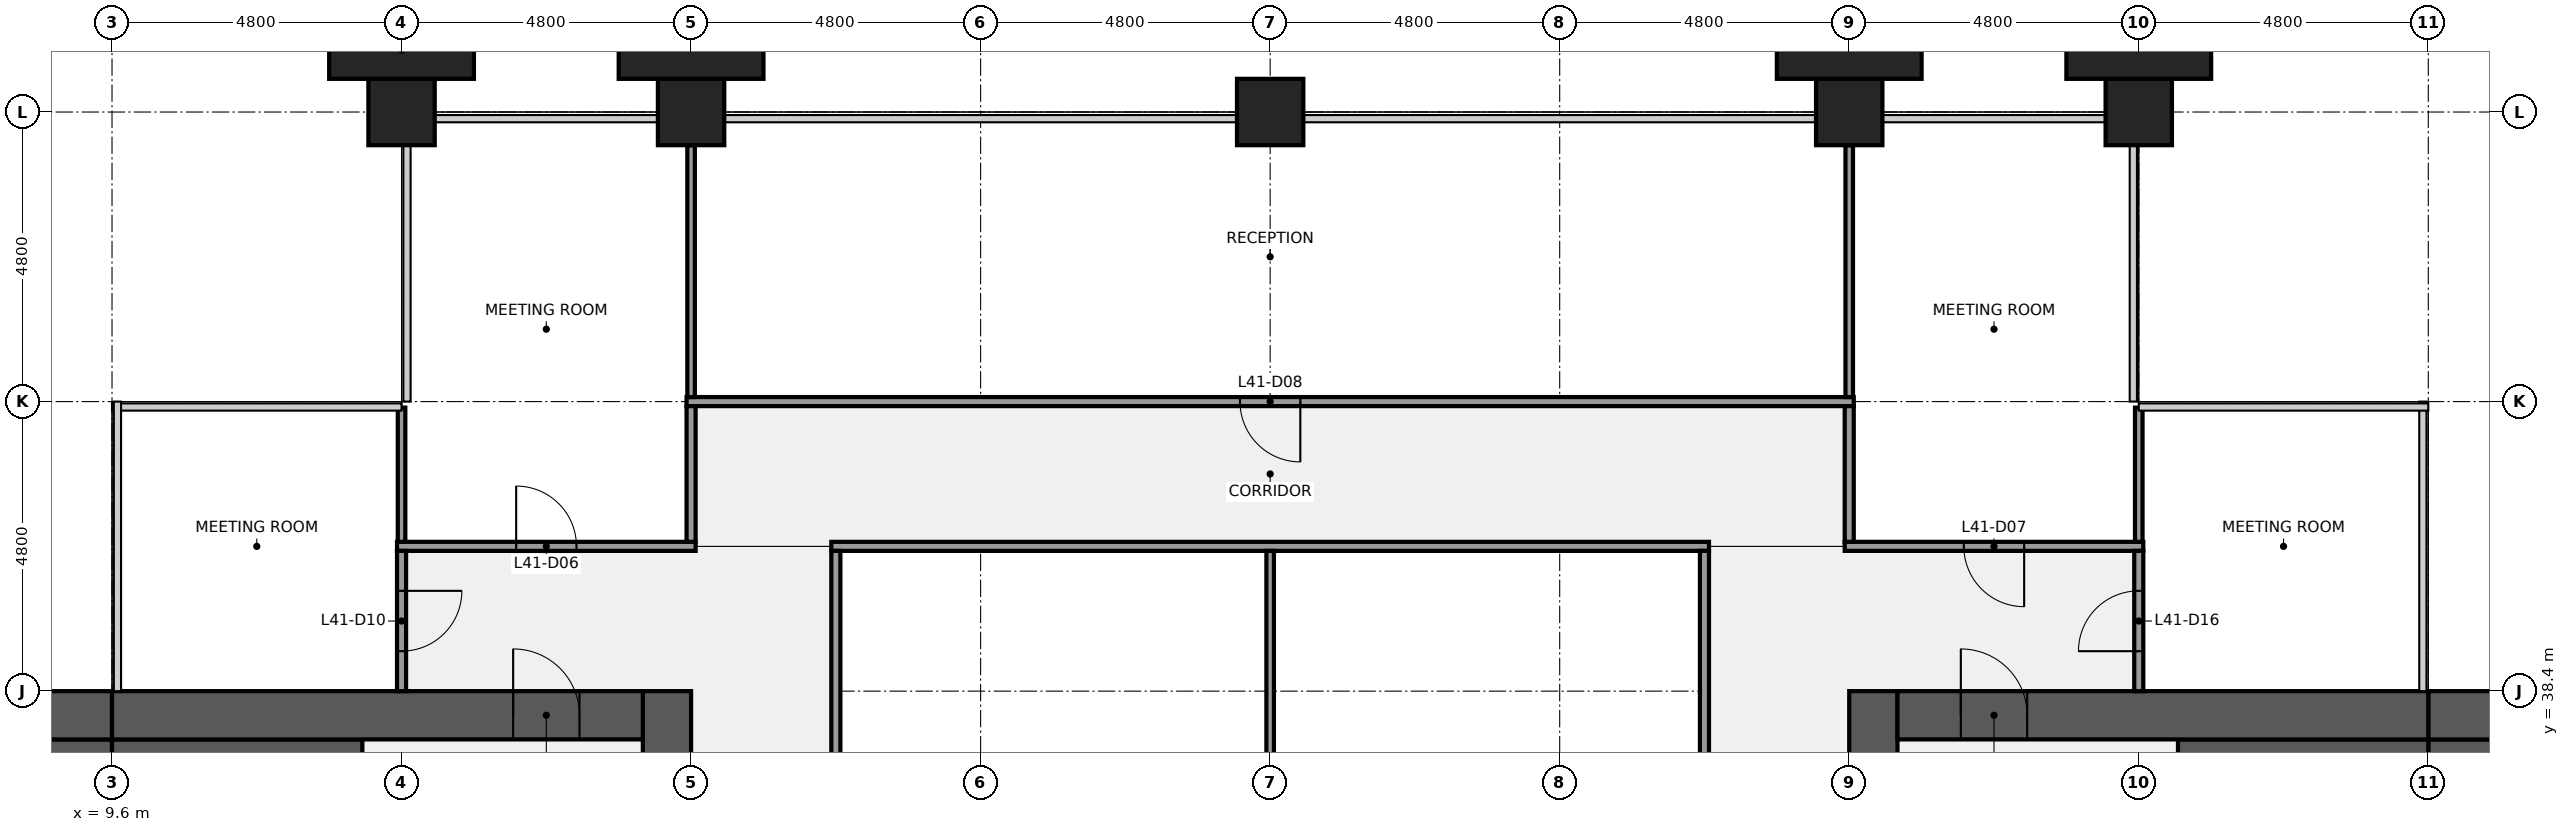
"""IFC4 building model, lengths in metres.
Left out: names, types, materials, properties, quantities, classifications, styles, units other than length and angle.
Written with IfcOpenShell. Run it as: python <this file> out.ifc"""

import sys

from ifc_helpers import new_model, si_unit, direction, frame, frame_2d, origin, origin_2d, place, context, subcontext, project, spatial, rectangle, extrude, element, fill, save


model = new_model("IFC4")
c1 = context("Model", 3, precision=1e-05, world=origin(), true_north=direction((0.0, 1.0)))
c2 = subcontext(c1, "Body", "Model", "MODEL_VIEW")
j1 = project(units=[si_unit("LENGTHUNIT", "METRE"), si_unit("PLANEANGLEUNIT", "RADIAN")], contexts=[c1])
p1 = place(None, origin())
s1 = spatial("IfcSite", under=j1, at=p1, CompositionType="ELEMENT")
p2 = place(p1, origin())
s2 = spatial("IfcBuilding", under=s1, at=p2, CompositionType="ELEMENT")
p3 = place(p2, frame((0.0, 0.0, 193.2)))
s3 = spatial("IfcBuildingStorey", under=s2, at=p3, CompositionType="ELEMENT", Elevation=193.2)
for number, where, z_axis, x_axis in (
    (1, (14.4, 48.0, 0.0), (0.0, 0.0, 1.0), (1.0, 0.0, 0.0)),
    (2, (19.2, 48.0, 0.0), (0.0, 0.0, 1.0), (1.0, 0.0, 0.0)),
    (3, (28.8, 48.0, 0.0), (0.0, 0.0, 1.0), (1.0, 0.0, 0.0)),
    (4, (38.4, 48.0, 0.0), (0.0, 0.0, 1.0), (1.0, 0.0, 0.0)),
    (5, (43.2, 48.0, 0.0), (0.0, 0.0, 1.0), (1.0, 0.0, 0.0)),
):
    element("IfcColumn", number, at=place(p3, frame(where, z_axis=z_axis, x_axis=x_axis)), inside=s3, PredefinedType="COLUMN", context=c2, shape_type="SweptSolid", body=[
        extrude(rectangle(XDim=1.1, YDim=1.1, at=origin_2d()), origin(), (0.0, 0.0, 1.0), 4.0),
    ])
p4 = place(p3, frame((18.8, 38.4, 0.0), z_axis=(0.0, 0.0, 1.0), x_axis=(0.0, -1.0, 0.0)))
e6 = element("IfcWall", 6, at=p4, inside=s3, PredefinedType="SHEAR", context=c2, shape_type="SweptSolid", body=[
    extrude(rectangle(XDim=28.8, YDim=0.8, at=frame_2d((14.4, 0.0))), origin(), (0.0, 0.0, 1.0), 3.84),
])
p5 = place(p4, frame((18.3, 0.0, 0.0)))
e7 = element("IfcOpeningElement", 7, at=p5, cuts=e6, PredefinedType="OPENING", context=c2, shape_type="SweptSolid", body=[
    extrude(rectangle(XDim=1.8, YDim=2.1, at=frame_2d((0.9, 1.05))), frame((0.0, 0.41, 0.0), z_axis=(0.0, -1.0, 0.0), x_axis=(1.0, 0.0, 0.0)), (0.0, 0.0, 1.0), 0.82),
])
p6 = place(p4, frame((8.7, 0.0, 0.0)))
e8 = element("IfcOpeningElement", 8, at=p6, cuts=e6, PredefinedType="OPENING", context=c2, shape_type="SweptSolid", body=[
    extrude(rectangle(XDim=1.8, YDim=2.1, at=frame_2d((0.9, 1.05))), frame((0.0, 0.41, 0.0), z_axis=(0.0, -1.0, 0.0), x_axis=(1.0, 0.0, 0.0)), (0.0, 0.0, 1.0), 0.82),
])
p7 = place(p3, frame((6.25, 37.4, 0.0), z_axis=(0.0, 0.0, 1.0), x_axis=(1.0, 0.0, 0.0)))
e9 = element("IfcWall", 9, at=p7, inside=s3, PredefinedType="SHEAR", context=c2, shape_type="SweptSolid", body=[
    extrude(rectangle(XDim=3.35, YDim=0.4, at=frame_2d((1.675, 0.0))), origin(), (0.0, 0.0, 1.0), 3.84),
])
p8 = place(p3, frame((9.6, 37.4, 0.0), z_axis=(0.0, 0.0, 1.0), x_axis=(1.0, 0.0, 0.0)))
e10 = element("IfcWall", 10, at=p8, inside=s3, PredefinedType="SHEAR", context=c2, shape_type="SweptSolid", body=[
    extrude(rectangle(XDim=4.15, YDim=0.4, at=frame_2d((2.075, 0.0))), origin(), (0.0, 0.0, 1.0), 3.84),
])
p9 = place(p3, frame((0.8, 38.0, 0.0), z_axis=(0.0, 0.0, 1.0), x_axis=(1.0, 0.0, 0.0)))
e11 = element("IfcWall", 11, at=p9, inside=s3, PredefinedType="SHEAR", context=c2, shape_type="SweptSolid", body=[
    extrude(rectangle(XDim=8.8, YDim=0.8, at=frame_2d((4.4, 0.0))), origin(), (0.0, 0.0, 1.0), 3.84),
])
p10 = place(p9, frame((5.5, 0.0, 0.9)))
e12 = element("IfcOpeningElement", 12, at=p10, cuts=e11, PredefinedType="OPENING", context=c2, shape_type="SweptSolid", body=[
    extrude(rectangle(XDim=1.8, YDim=1.5, at=frame_2d((0.9, 0.75))), frame((0.0, 0.41, 0.0), z_axis=(0.0, -1.0, 0.0), x_axis=(1.0, 0.0, 0.0)), (0.0, 0.0, 1.0), 0.82),
])
p11 = place(p3, frame((9.6, 38.0, 0.0), z_axis=(0.0, 0.0, 1.0), x_axis=(1.0, 0.0, 0.0)))
e13 = element("IfcWall", 13, at=p11, inside=s3, PredefinedType="SHEAR", context=c2, shape_type="SweptSolid", body=[
    extrude(rectangle(XDim=8.8, YDim=0.8, at=frame_2d((4.4, 0.0))), origin(), (0.0, 0.0, 1.0), 3.84),
])
p12 = place(p11, frame((6.65, 0.0, 0.0)))
e14 = element("IfcOpeningElement", 14, at=p12, cuts=e13, PredefinedType="OPENING", context=c2, shape_type="SweptSolid", body=[
    extrude(rectangle(XDim=1.1, YDim=2.1, at=frame_2d((0.55, 1.05))), frame((0.0, 0.41, 0.0), z_axis=(0.0, -1.0, 0.0), x_axis=(1.0, 0.0, 0.0)), (0.0, 0.0, 1.0), 0.82),
])
p13 = place(p3, frame((38.8, 9.6, 0.0), z_axis=(0.0, 0.0, 1.0), x_axis=(0.0, 1.0, 0.0)))
e15 = element("IfcWall", 15, at=p13, inside=s3, PredefinedType="SHEAR", context=c2, shape_type="SweptSolid", body=[
    extrude(rectangle(XDim=28.8, YDim=0.8, at=frame_2d((14.4, 0.0))), origin(), (0.0, 0.0, 1.0), 3.84),
])
p14 = place(p13, frame((8.7, 0.0, 0.0)))
e16 = element("IfcOpeningElement", 16, at=p14, cuts=e15, PredefinedType="OPENING", context=c2, shape_type="SweptSolid", body=[
    extrude(rectangle(XDim=1.8, YDim=2.1, at=frame_2d((0.9, 1.05))), frame((0.0, 0.41, 0.0), z_axis=(0.0, -1.0, 0.0), x_axis=(1.0, 0.0, 0.0)), (0.0, 0.0, 1.0), 0.82),
])
p15 = place(p13, frame((18.3, 0.0, 0.0)))
e17 = element("IfcOpeningElement", 17, at=p15, cuts=e15, PredefinedType="OPENING", context=c2, shape_type="SweptSolid", body=[
    extrude(rectangle(XDim=1.8, YDim=2.1, at=frame_2d((0.9, 1.05))), frame((0.0, 0.41, 0.0), z_axis=(0.0, -1.0, 0.0), x_axis=(1.0, 0.0, 0.0)), (0.0, 0.0, 1.0), 0.82),
])
p16 = place(p3, frame((48.0, 37.4, 0.0), z_axis=(0.0, 0.0, 1.0), x_axis=(1.0, 0.0, 0.0)))
e18 = element("IfcWall", 18, at=p16, inside=s3, PredefinedType="SHEAR", context=c2, shape_type="SweptSolid", body=[
    extrude(rectangle(XDim=3.35, YDim=0.4, at=frame_2d((1.675, 0.0))), origin(), (0.0, 0.0, 1.0), 3.84),
])
p17 = place(p3, frame((43.85, 37.4, 0.0), z_axis=(0.0, 0.0, 1.0), x_axis=(1.0, 0.0, 0.0)))
e19 = element("IfcWall", 19, at=p17, inside=s3, PredefinedType="SHEAR", context=c2, shape_type="SweptSolid", body=[
    extrude(rectangle(XDim=4.15, YDim=0.4, at=frame_2d((2.075, 0.0))), origin(), (0.0, 0.0, 1.0), 3.84),
])
p18 = place(p3, frame((48.0, 38.0, 0.0), z_axis=(0.0, 0.0, 1.0), x_axis=(1.0, 0.0, 0.0)))
e20 = element("IfcWall", 20, at=p18, inside=s3, PredefinedType="SHEAR", context=c2, shape_type="SweptSolid", body=[
    extrude(rectangle(XDim=8.8, YDim=0.8, at=frame_2d((4.4, 0.0))), origin(), (0.0, 0.0, 1.0), 3.84),
])
p19 = place(p18, frame((1.5, 0.0, 0.9)))
e21 = element("IfcOpeningElement", 21, at=p19, cuts=e20, PredefinedType="OPENING", context=c2, shape_type="SweptSolid", body=[
    extrude(rectangle(XDim=1.8, YDim=1.5, at=frame_2d((0.9, 0.75))), frame((0.0, 0.41, 0.0), z_axis=(0.0, -1.0, 0.0), x_axis=(1.0, 0.0, 0.0)), (0.0, 0.0, 1.0), 0.82),
])
p20 = place(p3, frame((39.2, 38.0, 0.0), z_axis=(0.0, 0.0, 1.0), x_axis=(1.0, 0.0, 0.0)))
e22 = element("IfcWall", 22, at=p20, inside=s3, PredefinedType="SHEAR", context=c2, shape_type="SweptSolid", body=[
    extrude(rectangle(XDim=8.8, YDim=0.8, at=frame_2d((4.4, 0.0))), origin(), (0.0, 0.0, 1.0), 3.84),
])
p21 = place(p20, frame((1.05, 0.0, 0.0)))
e23 = element("IfcOpeningElement", 23, at=p21, cuts=e22, PredefinedType="OPENING", context=c2, shape_type="SweptSolid", body=[
    extrude(rectangle(XDim=1.1, YDim=2.1, at=frame_2d((0.55, 1.05))), frame((0.0, 0.41, 0.0), z_axis=(0.0, -1.0, 0.0), x_axis=(1.0, 0.0, 0.0)), (0.0, 0.0, 1.0), 0.82),
])
p22 = place(p3, frame((14.325, 40.8, 0.0), z_axis=(0.0, 0.0, 1.0), x_axis=(1.0, 0.0, 0.0)))
e24 = element("IfcWall", 24, at=p22, inside=s3, PredefinedType="PARTITIONING", context=c2, shape_type="SweptSolid", body=[
    extrude(rectangle(XDim=4.95, YDim=0.15, at=frame_2d((2.475, 0.0))), origin(), (0.0, 0.0, 1.0), 2.849),
])
p23 = place(p22, frame((1.975, 0.0, 0.0)))
e25 = element("IfcOpeningElement", 25, at=p23, cuts=e24, PredefinedType="OPENING", context=c2, shape_type="SweptSolid", body=[
    extrude(rectangle(XDim=1.0, YDim=2.1, at=frame_2d((0.5, 1.05))), frame((0.0, 0.085, 0.0), z_axis=(0.0, -1.0, 0.0), x_axis=(1.0, 0.0, 0.0)), (0.0, 0.0, 1.0), 0.17),
])
p24 = place(p3, frame((21.525, 40.8, 0.0), z_axis=(0.0, 0.0, 1.0), x_axis=(1.0, 0.0, 0.0)))
e26 = element("IfcWall", 26, at=p24, inside=s3, PredefinedType="PARTITIONING", context=c2, shape_type="SweptSolid", body=[
    extrude(rectangle(XDim=14.55, YDim=0.15, at=frame_2d((7.275, 0.0))), origin(), (0.0, 0.0, 1.0), 2.849),
])
p25 = place(p3, frame((38.325, 40.8, 0.0), z_axis=(0.0, 0.0, 1.0), x_axis=(1.0, 0.0, 0.0)))
e27 = element("IfcWall", 27, at=p25, inside=s3, PredefinedType="PARTITIONING", context=c2, shape_type="SweptSolid", body=[
    extrude(rectangle(XDim=4.95, YDim=0.15, at=frame_2d((2.475, 0.0))), origin(), (0.0, 0.0, 1.0), 2.849),
])
p26 = place(p25, frame((1.975, 0.0, 0.0)))
e28 = element("IfcOpeningElement", 28, at=p26, cuts=e27, PredefinedType="OPENING", context=c2, shape_type="SweptSolid", body=[
    extrude(rectangle(XDim=1.0, YDim=2.1, at=frame_2d((0.5, 1.05))), frame((0.0, 0.085, 0.0), z_axis=(0.0, -1.0, 0.0), x_axis=(1.0, 0.0, 0.0)), (0.0, 0.0, 1.0), 0.17),
])
p27 = place(p3, frame((19.125, 43.2, 0.0), z_axis=(0.0, 0.0, 1.0), x_axis=(1.0, 0.0, 0.0)))
e29 = element("IfcWall", 29, at=p27, inside=s3, PredefinedType="PARTITIONING", context=c2, shape_type="SweptSolid", body=[
    extrude(rectangle(XDim=19.35, YDim=0.15, at=frame_2d((9.675, 0.0))), origin(), (0.0, 0.0, 1.0), 2.849),
])
p28 = place(p27, frame((9.175, 0.0, 0.0)))
e30 = element("IfcOpeningElement", 30, at=p28, cuts=e29, PredefinedType="OPENING", context=c2, shape_type="SweptSolid", body=[
    extrude(rectangle(XDim=1.0, YDim=2.1, at=frame_2d((0.5, 1.05))), frame((0.0, 0.085, 0.0), z_axis=(0.0, -1.0, 0.0), x_axis=(1.0, 0.0, 0.0)), (0.0, 0.0, 1.0), 0.17),
])
p29 = place(p3, frame((14.4, 40.875, 0.0), z_axis=(0.0, 0.0, 1.0), x_axis=(0.0, 1.0, 0.0)))
e31 = element("IfcWall", 31, at=p29, inside=s3, PredefinedType="PARTITIONING", context=c2, shape_type="SweptSolid", body=[
    extrude(rectangle(XDim=2.225, YDim=0.125, at=frame_2d((1.113, 0.0))), origin(), (0.0, 0.0, 1.0), 2.849),
])
p30 = place(p3, frame((14.4, 38.4, 0.0), z_axis=(0.0, 0.0, 1.0), x_axis=(0.0, 1.0, 0.0)))
e32 = element("IfcWall", 32, at=p30, inside=s3, PredefinedType="PARTITIONING", context=c2, shape_type="SweptSolid", body=[
    extrude(rectangle(XDim=2.325, YDim=0.15, at=frame_2d((1.163, 0.0))), origin(), (0.0, 0.0, 1.0), 2.849),
])
p31 = place(p30, frame((0.663, 0.0, 0.0)))
e33 = element("IfcOpeningElement", 33, at=p31, cuts=e32, PredefinedType="OPENING", context=c2, shape_type="SweptSolid", body=[
    extrude(rectangle(XDim=1.0, YDim=2.1, at=frame_2d((0.5, 1.05))), frame((0.0, 0.085, 0.0), z_axis=(0.0, -1.0, 0.0), x_axis=(1.0, 0.0, 0.0)), (0.0, 0.0, 1.0), 0.17),
])
p32 = place(p3, frame((19.2, 43.275, 0.0), z_axis=(0.0, 0.0, 1.0), x_axis=(0.0, 1.0, 0.0)))
e34 = element("IfcWall", 34, at=p32, inside=s3, PredefinedType="PARTITIONING", context=c2, shape_type="SweptSolid", body=[
    extrude(rectangle(XDim=4.175, YDim=0.125, at=frame_2d((2.087, 0.0))), origin(), (0.0, 0.0, 1.0), 2.849),
])
p33 = place(p3, frame((19.2, 40.875, 0.0), z_axis=(0.0, 0.0, 1.0), x_axis=(0.0, 1.0, 0.0)))
e35 = element("IfcWall", 35, at=p33, inside=s3, PredefinedType="PARTITIONING", context=c2, shape_type="SweptSolid", body=[
    extrude(rectangle(XDim=2.25, YDim=0.15, at=frame_2d((1.125, 0.0))), origin(), (0.0, 0.0, 1.0), 2.849),
])
p34 = place(p3, frame((21.6, 21.663, 0.0), z_axis=(0.0, 0.0, 1.0), x_axis=(0.0, 1.0, 0.0)))
e36 = element("IfcWall", 36, at=p34, inside=s3, PredefinedType="PARTITIONING", context=c2, shape_type="SweptSolid", body=[
    extrude(rectangle(XDim=19.062, YDim=0.15, at=frame_2d((9.531, 0.0))), origin(), (0.0, 0.0, 1.0), 2.849),
])
p35 = place(p34, frame((9.031, 0.0, 0.0)))
e37 = element("IfcOpeningElement", 37, at=p35, cuts=e36, PredefinedType="OPENING", context=c2, shape_type="SweptSolid", body=[
    extrude(rectangle(XDim=1.0, YDim=2.1, at=frame_2d((0.5, 1.05))), frame((0.0, 0.085, 0.0), z_axis=(0.0, -1.0, 0.0), x_axis=(1.0, 0.0, 0.0)), (0.0, 0.0, 1.0), 0.17),
])
p36 = place(p3, frame((28.8, 21.663, 0.0), z_axis=(0.0, 0.0, 1.0), x_axis=(0.0, 1.0, 0.0)))
e38 = element("IfcWall", 38, at=p36, inside=s3, PredefinedType="PARTITIONING", context=c2, shape_type="SweptSolid", body=[
    extrude(rectangle(XDim=19.062, YDim=0.125, at=frame_2d((9.531, 0.0))), origin(), (0.0, 0.0, 1.0), 2.849),
])
p37 = place(p3, frame((36.0, 21.663, 0.0), z_axis=(0.0, 0.0, 1.0), x_axis=(0.0, 1.0, 0.0)))
e39 = element("IfcWall", 39, at=p37, inside=s3, PredefinedType="PARTITIONING", context=c2, shape_type="SweptSolid", body=[
    extrude(rectangle(XDim=19.062, YDim=0.15, at=frame_2d((9.531, 0.0))), origin(), (0.0, 0.0, 1.0), 2.849),
])
p38 = place(p37, frame((9.031, 0.0, 0.0)))
e40 = element("IfcOpeningElement", 40, at=p38, cuts=e39, PredefinedType="OPENING", context=c2, shape_type="SweptSolid", body=[
    extrude(rectangle(XDim=1.0, YDim=2.1, at=frame_2d((0.5, 1.05))), frame((0.0, 0.085, 0.0), z_axis=(0.0, -1.0, 0.0), x_axis=(1.0, 0.0, 0.0)), (0.0, 0.0, 1.0), 0.17),
])
p39 = place(p3, frame((38.4, 43.275, 0.0), z_axis=(0.0, 0.0, 1.0), x_axis=(0.0, 1.0, 0.0)))
e41 = element("IfcWall", 41, at=p39, inside=s3, PredefinedType="PARTITIONING", context=c2, shape_type="SweptSolid", body=[
    extrude(rectangle(XDim=4.175, YDim=0.125, at=frame_2d((2.087, 0.0))), origin(), (0.0, 0.0, 1.0), 2.849),
])
p40 = place(p3, frame((38.4, 40.875, 0.0), z_axis=(0.0, 0.0, 1.0), x_axis=(0.0, 1.0, 0.0)))
e42 = element("IfcWall", 42, at=p40, inside=s3, PredefinedType="PARTITIONING", context=c2, shape_type="SweptSolid", body=[
    extrude(rectangle(XDim=2.25, YDim=0.15, at=frame_2d((1.125, 0.0))), origin(), (0.0, 0.0, 1.0), 2.849),
])
p41 = place(p3, frame((43.2, 40.875, 0.0), z_axis=(0.0, 0.0, 1.0), x_axis=(0.0, 1.0, 0.0)))
e43 = element("IfcWall", 43, at=p41, inside=s3, PredefinedType="PARTITIONING", context=c2, shape_type="SweptSolid", body=[
    extrude(rectangle(XDim=2.225, YDim=0.125, at=frame_2d((1.113, 0.0))), origin(), (0.0, 0.0, 1.0), 2.849),
])
p42 = place(p3, frame((43.2, 38.4, 0.0), z_axis=(0.0, 0.0, 1.0), x_axis=(0.0, 1.0, 0.0)))
e44 = element("IfcWall", 44, at=p42, inside=s3, PredefinedType="PARTITIONING", context=c2, shape_type="SweptSolid", body=[
    extrude(rectangle(XDim=2.325, YDim=0.15, at=frame_2d((1.163, 0.0))), origin(), (0.0, 0.0, 1.0), 2.849),
])
p43 = place(p42, frame((0.663, 0.0, 0.0)))
e45 = element("IfcOpeningElement", 45, at=p43, cuts=e44, PredefinedType="OPENING", context=c2, shape_type="SweptSolid", body=[
    extrude(rectangle(XDim=1.0, YDim=2.1, at=frame_2d((0.5, 1.05))), frame((0.0, 0.085, 0.0), z_axis=(0.0, -1.0, 0.0), x_axis=(1.0, 0.0, 0.0)), (0.0, 0.0, 1.0), 0.17),
])
for number, where, z_axis, x_axis in (
    (46, (14.4, 49.025, 0.0), (0.0, 0.0, 1.0), (1.0, 0.0, 0.0)),
    (47, (19.2, 49.025, 0.0), (0.0, 0.0, 1.0), (1.0, 0.0, 0.0)),
    (48, (38.4, 49.025, 0.0), (0.0, 0.0, 1.0), (1.0, 0.0, 0.0)),
    (49, (43.2, 49.025, 0.0), (0.0, 0.0, 1.0), (1.0, 0.0, 0.0)),
):
    element("IfcColumn", number, at=place(p3, frame(where, z_axis=z_axis, x_axis=x_axis)), inside=s3, PredefinedType="PILASTER", context=c2, shape_type="SweptSolid", body=[
        extrude(rectangle(XDim=2.4, YDim=0.95, at=origin_2d()), origin(), (0.0, 0.0, 1.0), 4.0),
    ])
p44 = place(p12, origin())
e50 = element("IfcDoor", 50, at=p44, inside=s3, OperationType="SINGLE_SWING_LEFT", PredefinedType="DOOR", context=c2, shape_type="SweptSolid", body=[
    extrude(rectangle(XDim=1.1, YDim=2.1, at=frame_2d((0.55, 1.05))), frame((0.0, 0.025, 0.0), z_axis=(0.0, -1.0, 0.0), x_axis=(1.0, 0.0, 0.0)), (0.0, 0.0, 1.0), 0.05),
])
fill(e14, e50)
p45 = place(p21, origin())
e51 = element("IfcDoor", 51, at=p45, inside=s3, OperationType="SINGLE_SWING_LEFT", PredefinedType="DOOR", context=c2, shape_type="SweptSolid", body=[
    extrude(rectangle(XDim=1.1, YDim=2.1, at=frame_2d((0.55, 1.05))), frame((0.0, 0.025, 0.0), z_axis=(0.0, -1.0, 0.0), x_axis=(1.0, 0.0, 0.0)), (0.0, 0.0, 1.0), 0.05),
])
fill(e23, e51)
p46 = place(p23, origin())
e52 = element("IfcDoor", 52, at=p46, inside=s3, OperationType="SINGLE_SWING_LEFT", PredefinedType="DOOR", context=c2, shape_type="SweptSolid", body=[
    extrude(rectangle(XDim=1.0, YDim=2.1, at=frame_2d((0.5, 1.05))), frame((0.0, 0.025, 0.0), z_axis=(0.0, -1.0, 0.0), x_axis=(1.0, 0.0, 0.0)), (0.0, 0.0, 1.0), 0.05),
])
fill(e25, e52)
p47 = place(p26, origin())
e53 = element("IfcDoor", 53, at=p47, inside=s3, OperationType="SINGLE_SWING_RIGHT", PredefinedType="DOOR", context=c2, shape_type="SweptSolid", body=[
    extrude(rectangle(XDim=1.0, YDim=2.1, at=frame_2d((0.5, 1.05))), frame((0.0, 0.025, 0.0), z_axis=(0.0, -1.0, 0.0), x_axis=(1.0, 0.0, 0.0)), (0.0, 0.0, 1.0), 0.05),
])
fill(e28, e53)
p48 = place(p28, origin())
e54 = element("IfcDoor", 54, at=p48, inside=s3, OperationType="SINGLE_SWING_RIGHT", PredefinedType="DOOR", context=c2, shape_type="SweptSolid", body=[
    extrude(rectangle(XDim=1.0, YDim=2.1, at=frame_2d((0.5, 1.05))), frame((0.0, 0.025, 0.0), z_axis=(0.0, -1.0, 0.0), x_axis=(1.0, 0.0, 0.0)), (0.0, 0.0, 1.0), 0.05),
])
fill(e30, e54)
p49 = place(p31, origin())
e55 = element("IfcDoor", 55, at=p49, inside=s3, OperationType="SINGLE_SWING_RIGHT", PredefinedType="DOOR", context=c2, shape_type="SweptSolid", body=[
    extrude(rectangle(XDim=1.0, YDim=2.1, at=frame_2d((0.5, 1.05))), frame((0.0, 0.025, 0.0), z_axis=(0.0, -1.0, 0.0), x_axis=(1.0, 0.0, 0.0)), (0.0, 0.0, 1.0), 0.05),
])
fill(e33, e55)
p50 = place(p43, origin())
e56 = element("IfcDoor", 56, at=p50, inside=s3, OperationType="SINGLE_SWING_LEFT", PredefinedType="DOOR", context=c2, shape_type="SweptSolid", body=[
    extrude(rectangle(XDim=1.0, YDim=2.1, at=frame_2d((0.5, 1.05))), frame((0.0, 0.025, 0.0), z_axis=(0.0, -1.0, 0.0), x_axis=(1.0, 0.0, 0.0)), (0.0, 0.0, 1.0), 0.05),
])
fill(e45, e56)
save(model, sys.argv[1])
